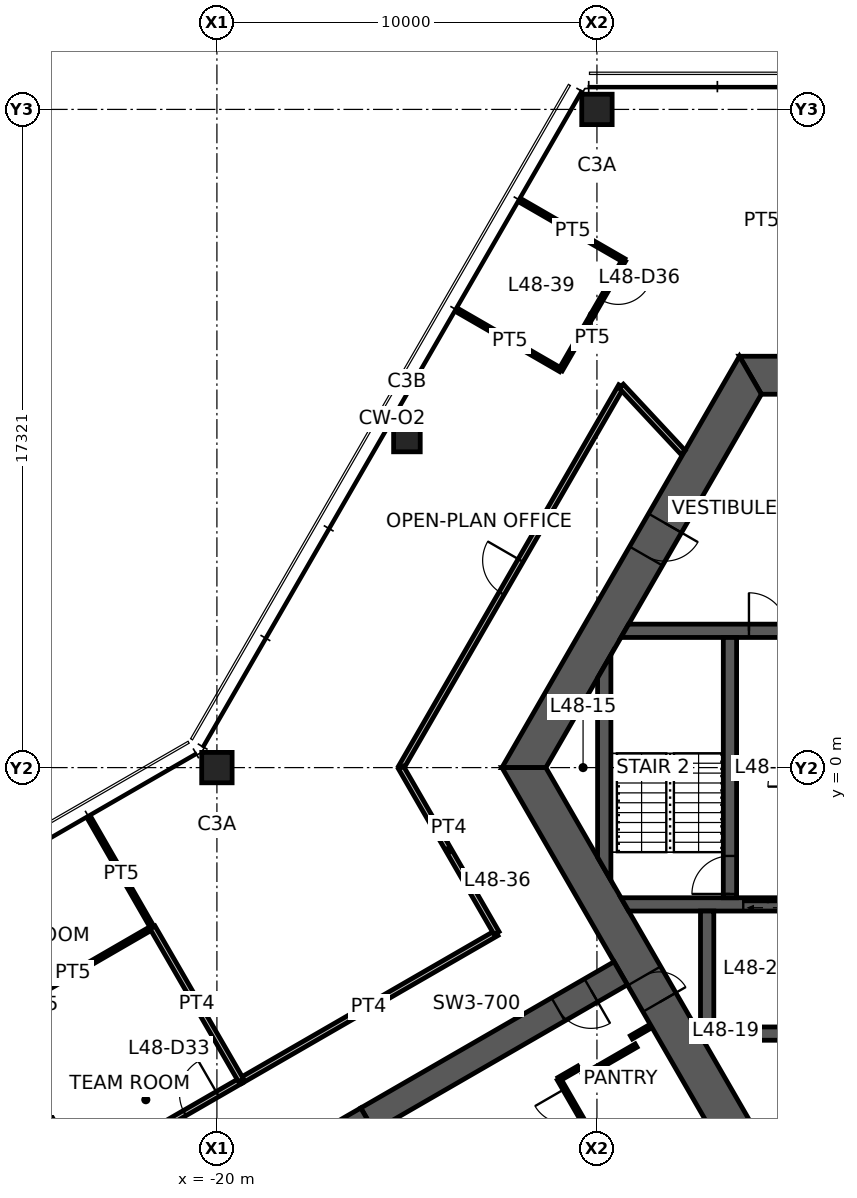
"""IFC4 building model, lengths in metres.
Left out: names, types, materials, properties, quantities, classifications, styles, units other than length and angle.
Written with IfcOpenShell. Run it as: python <this file> out.ifc"""

import sys

from ifc_helpers import new_model, si_unit, direction, frame, frame_2d, origin, origin_2d, place, context, subcontext, project, spatial, polyline, rectangle, hollow_rectangle, outline, extrude, element, fill, save


model = new_model("IFC4")
c1 = context("Model", 3, precision=1e-05, world=origin(), true_north=direction((0.0, 1.0)))
c2 = subcontext(c1, "Body", "Model", "MODEL_VIEW")
j1 = project(units=[si_unit("LENGTHUNIT", "METRE"), si_unit("PLANEANGLEUNIT", "RADIAN")], contexts=[c1])
p1 = place(None, origin())
s1 = spatial("IfcSite", under=j1, at=p1, CompositionType="ELEMENT")
p2 = place(p1, origin())
s2 = spatial("IfcBuilding", under=s1, at=p2, CompositionType="ELEMENT")
p3 = place(p2, frame((0.0, 0.0, 191.6)))
s3 = spatial("IfcBuildingStorey", under=s2, at=p3, CompositionType="ELEMENT", Elevation=191.6)
for number, where, z_axis, x_axis in (
    (1, (-10.0, 17.321, 0.0), (0.0, 0.0, 1.0), (1.0, 0.0, 0.0)),
    (2, (-20.0, 0.0, 0.0), (0.0, 0.0, 1.0), (1.0, 0.0, 0.0)),
):
    element("IfcColumn", number, at=place(p3, frame(where, z_axis=z_axis, x_axis=x_axis)), inside=s3, PredefinedType="COLUMN", context=c2, shape_type="SweptSolid", body=[
        extrude(hollow_rectangle(XDim=0.8, YDim=0.8, WallThickness=0.045, at=origin_2d()), origin(), (0.0, 0.0, 1.0), 3.9),
    ])
p4 = place(p3, frame((-15.0, 8.66, 0.0), z_axis=(0.0, 0.0, 1.0), x_axis=(1.0, 0.0, 0.0)))
e3 = element("IfcColumn", 3, at=p4, inside=s3, PredefinedType="COLUMN", context=c2, shape_type="SweptSolid", body=[
    extrude(hollow_rectangle(XDim=0.7, YDim=0.7, WallThickness=0.036, at=origin_2d()), origin(), (0.0, 0.0, 1.0), 3.9),
])
p5 = place(p3, frame((5.961, 10.325, 0.0), z_axis=(0.0, 0.0, 1.0), x_axis=(-1.0, 0.0, 0.0)))
e4 = element("IfcWall", 4, at=p5, inside=s3, PredefinedType="SHEAR", context=c2, shape_type="SweptSolid", body=[
    extrude(outline(polyline([(-0.289, -0.5), (4.624, -0.5), (5.523, -0.5), (6.399, -0.5), (7.299, -0.5), (12.211, -0.5), (11.634, 0.5), (7.299, 0.5), (6.399, 0.5), (5.523, 0.5), (4.624, 0.5), (0.289, 0.5), (-0.289, -0.5)])), origin(), (0.0, 0.0, 1.0), 3.9),
])
p6 = place(p5, frame((6.399, 0.0, 0.0)))
e5 = element("IfcOpeningElement", 5, at=p6, cuts=e4, PredefinedType="OPENING", context=c2, shape_type="SweptSolid", body=[
    extrude(rectangle(XDim=0.9, YDim=2.1, at=frame_2d((0.45, 1.05))), frame((0.0, 0.51, 0.0), z_axis=(0.0, -1.0, 0.0), x_axis=(1.0, 0.0, 0.0)), (0.0, 0.0, 1.0), 1.02),
])
p7 = place(p5, frame((4.624, 0.0, 0.0)))
e6 = element("IfcOpeningElement", 6, at=p7, cuts=e4, PredefinedType="OPENING", context=c2, shape_type="SweptSolid", body=[
    extrude(rectangle(XDim=0.9, YDim=2.1, at=frame_2d((0.45, 1.05))), frame((0.0, 0.51, 0.0), z_axis=(0.0, -1.0, 0.0), x_axis=(1.0, 0.0, 0.0)), (0.0, 0.0, 1.0), 1.02),
])
p8 = place(p3, frame((-5.961, 10.325, 0.0), z_axis=(0.0, 0.0, 1.0), x_axis=(-0.500004296715, -0.866022923061, 0.0)))
e7 = element("IfcWall", 7, at=p8, inside=s3, PredefinedType="SHEAR", context=c2, shape_type="SweptSolid", body=[
    extrude(outline(polyline([(-0.289, -0.5), (4.494, -0.5), (5.494, -0.5), (12.211, -0.5), (11.634, 0.5), (5.494, 0.5), (4.494, 0.5), (0.289, 0.5), (-0.289, -0.5)])), origin(), (0.0, 0.0, 1.0), 3.9),
])
p9 = place(p8, frame((4.494, 0.0, 0.0)))
e8 = element("IfcOpeningElement", 8, at=p9, cuts=e7, PredefinedType="OPENING", context=c2, shape_type="SweptSolid", body=[
    extrude(rectangle(XDim=1.0, YDim=2.1, at=frame_2d((0.5, 1.05))), frame((0.0, 0.51, 0.0), z_axis=(0.0, -1.0, 0.0), x_axis=(1.0, 0.0, 0.0)), (0.0, 0.0, 1.0), 1.02),
])
p10 = place(p3, frame((-11.922, 0.0, 0.0), z_axis=(0.0, 0.0, 1.0), x_axis=(0.500004296715, -0.866022923061, 0.0)))
e9 = element("IfcWall", 9, at=p10, inside=s3, PredefinedType="SHEAR", context=c2, shape_type="SweptSolid", body=[
    extrude(outline(polyline([(-0.289, -0.5), (6.331, -0.5), (7.131, -0.5), (12.211, -0.5), (11.634, 0.5), (7.131, 0.5), (6.331, 0.5), (0.289, 0.5), (-0.289, -0.5)])), origin(), (0.0, 0.0, 1.0), 3.9),
])
p11 = place(p10, frame((6.331, 0.0, 0.0)))
e10 = element("IfcOpeningElement", 10, at=p11, cuts=e9, PredefinedType="OPENING", context=c2, shape_type="SweptSolid", body=[
    extrude(rectangle(XDim=0.8, YDim=2.1, at=frame_2d((0.4, 1.05))), frame((0.0, 0.51, 0.0), z_axis=(0.0, -1.0, 0.0), x_axis=(1.0, 0.0, 0.0)), (0.0, 0.0, 1.0), 1.02),
])
p12 = place(p3, frame((-9.375, -5.413, 0.0), z_axis=(0.0, 0.0, 1.0), x_axis=(-0.866032377459, -0.499987921047, 0.0)))
e11 = element("IfcWall", 11, at=p12, inside=s3, PredefinedType="SHEAR", context=c2, shape_type="SweptSolid", body=[
    extrude(rectangle(XDim=7.696, YDim=0.7, at=frame_2d((3.848, 0.0))), origin(), (0.0, 0.0, 1.0), 3.9),
])
p13 = place(p12, frame((0.9, 0.0, 0.0)))
e12 = element("IfcOpeningElement", 12, at=p13, cuts=e11, PredefinedType="OPENING", context=c2, shape_type="SweptSolid", body=[
    extrude(rectangle(XDim=1.0, YDim=2.1, at=frame_2d((0.5, 1.05))), frame((0.0, 0.36, 0.0), z_axis=(0.0, -1.0, 0.0), x_axis=(1.0, 0.0, 0.0)), (0.0, 0.0, 1.0), 0.72),
])
p14 = place(p3, frame((-16.039, -9.26, 0.0), z_axis=(0.0, 0.0, 1.0), x_axis=(-0.866024837091, -0.50000098154, 0.0)))
e13 = element("IfcWall", 13, at=p14, inside=s3, PredefinedType="SHEAR", context=c2, shape_type="SweptSolid", body=[
    extrude(rectangle(XDim=13.0, YDim=0.7, at=frame_2d((6.5, 0.0))), origin(), (0.0, 0.0, 1.0), 3.9),
])
p15 = place(p3, frame((-9.266, 3.6, 0.0), z_axis=(0.0, 0.0, 1.0), x_axis=(1.0, 0.0, 0.0)))
e14 = element("IfcWall", 14, at=p15, inside=s3, PredefinedType="SHEAR", context=c2, shape_type="SweptSolid", body=[
    extrude(outline(polyline([(-0.101, -0.175), (3.266, -0.175), (4.266, -0.175), (5.667, -0.175), (6.767, -0.175), (7.841, -0.175), (7.841, 0.175), (6.767, 0.175), (5.667, 0.175), (4.266, 0.175), (3.266, 0.175), (0.101, 0.175), (-0.101, -0.175)])), origin(), (0.0, 0.0, 1.0), 3.9),
])
p16 = place(p15, frame((3.266, 0.0, 0.0)))
e15 = element("IfcOpeningElement", 15, at=p16, cuts=e14, PredefinedType="OPENING", context=c2, shape_type="SweptSolid", body=[
    extrude(rectangle(XDim=1.0, YDim=2.1, at=frame_2d((0.5, 1.05))), frame((0.0, 0.185, 0.0), z_axis=(0.0, -1.0, 0.0), x_axis=(1.0, 0.0, 0.0)), (0.0, 0.0, 1.0), 0.37),
])
p17 = place(p15, frame((5.667, 0.0, 0.0)))
e16 = element("IfcOpeningElement", 16, at=p17, cuts=e14, PredefinedType="OPENING", context=c2, shape_type="SweptSolid", body=[
    extrude(rectangle(XDim=1.1, YDim=2.1, at=frame_2d((0.55, 1.05))), frame((0.0, 0.185, 0.0), z_axis=(0.0, -1.0, 0.0), x_axis=(1.0, 0.0, 0.0)), (0.0, 0.0, 1.0), 0.37),
])
p18 = place(p3, frame((-9.266, -3.6, 0.0), z_axis=(0.0, 0.0, 1.0), x_axis=(1.0, 0.0, 0.0)))
e17 = element("IfcWall", 17, at=p18, inside=s3, PredefinedType="SHEAR", context=c2, shape_type="SweptSolid", body=[
    extrude(outline(polyline([(0.101, -0.175), (3.116, -0.175), (4.417, -0.175), (5.667, -0.175), (6.767, -0.175), (7.841, -0.175), (7.841, 0.175), (6.767, 0.175), (5.667, 0.175), (4.417, 0.175), (3.116, 0.175), (-0.101, 0.175), (0.101, -0.175)])), origin(), (0.0, 0.0, 1.0), 3.9),
])
p19 = place(p18, frame((5.667, 0.0, 0.0)))
e18 = element("IfcOpeningElement", 18, at=p19, cuts=e17, PredefinedType="OPENING", context=c2, shape_type="SweptSolid", body=[
    extrude(rectangle(XDim=1.1, YDim=2.1, at=frame_2d((0.55, 1.05))), frame((0.0, 0.185, 0.0), z_axis=(0.0, -1.0, 0.0), x_axis=(1.0, 0.0, 0.0)), (0.0, 0.0, 1.0), 0.37),
])
p20 = place(p18, frame((3.116, 0.0, 0.0)))
e19 = element("IfcOpeningElement", 19, at=p20, cuts=e17, PredefinedType="OPENING", context=c2, shape_type="SweptSolid", body=[
    extrude(rectangle(XDim=1.3, YDim=2.1, at=frame_2d((0.65, 1.05))), frame((0.0, 0.185, 0.0), z_axis=(0.0, -1.0, 0.0), x_axis=(1.0, 0.0, 0.0)), (0.0, 0.0, 1.0), 0.37),
])
p21 = place(p3, frame((-6.5, -3.425, 0.0), z_axis=(0.0, 0.0, 1.0), x_axis=(0.0, 1.0, 0.0)))
e20 = element("IfcWall", 20, at=p21, inside=s3, PredefinedType="SHEAR", context=c2, shape_type="SweptSolid", body=[
    extrude(rectangle(XDim=6.85, YDim=0.35, at=frame_2d((3.425, 0.0))), origin(), (0.0, 0.0, 1.0), 3.9),
])
p22 = place(p21, frame((0.1, 0.0, 0.0)))
e21 = element("IfcOpeningElement", 21, at=p22, cuts=e20, PredefinedType="OPENING", context=c2, shape_type="SweptSolid", body=[
    extrude(rectangle(XDim=1.0, YDim=2.1, at=frame_2d((0.5, 1.05))), frame((0.0, 0.185, 0.0), z_axis=(0.0, -1.0, 0.0), x_axis=(1.0, 0.0, 0.0)), (0.0, 0.0, 1.0), 0.37),
])
p23 = place(p3, frame((-6.925, -7.0, 0.0), z_axis=(0.0, 0.0, 1.0), x_axis=(1.0, 0.0, 0.0)))
e22 = element("IfcWall", 22, at=p23, inside=s3, PredefinedType="SHEAR", context=c2, shape_type="SweptSolid", body=[
    extrude(rectangle(XDim=2.25, YDim=0.35, at=frame_2d((1.125, 0.0))), origin(), (0.0, 0.0, 1.0), 3.9),
])
p24 = place(p3, frame((-7.1, -3.775, 0.0), z_axis=(0.0, 0.0, 1.0), x_axis=(0.0, -1.0, 0.0)))
e23 = element("IfcWall", 23, at=p24, inside=s3, PredefinedType="SHEAR", context=c2, shape_type="SweptSolid", body=[
    extrude(outline(polyline([(0.0, -0.175), (3.274, -0.175), (3.4, 0.0), (3.4, 0.175), (0.0, 0.175), (0.0, -0.175)])), origin(), (0.0, 0.0, 1.0), 3.9),
])
p25 = place(p3, frame((-9.808, -2.662, 0.0), z_axis=(0.0, 0.0, 1.0), x_axis=(0.0, 1.0, 0.0)))
e24 = element("IfcWall", 24, at=p25, inside=s3, PredefinedType="SHEAR", context=c2, shape_type="SweptSolid", body=[
    extrude(outline(polyline([(-0.303, -0.175), (5.628, -0.175), (5.021, 0.175), (0.303, 0.175), (-0.303, -0.175)])), origin(), (0.0, 0.0, 1.0), 3.9),
])
p26 = place(p3, frame((-19.372, -8.24, 0.0), z_axis=(0.0, 0.0, 1.0), x_axis=(0.866015031168, 0.500017965468, 0.0)))
e25 = element("IfcWall", 25, at=p26, inside=s3, PredefinedType="PARTITIONING", context=c2, shape_type="SweptSolid", body=[
    extrude(rectangle(XDim=7.771, YDim=0.15, at=frame_2d((3.886, 0.0))), origin(), (0.0, 0.0, 1.0), 2.95),
])
p27 = place(p3, frame((-15.156, 0.0, 0.0), z_axis=(0.0, 0.0, 1.0), x_axis=(0.500012970505, 0.86601791513, 0.0)))
e26 = element("IfcWall", 26, at=p27, inside=s3, PredefinedType="PARTITIONING", context=c2, shape_type="SweptSolid", body=[
    extrude(rectangle(XDim=11.591, YDim=0.15, at=frame_2d((5.795, 0.0))), origin(), (0.0, 0.0, 1.0), 2.95),
])
p28 = place(p27, frame((5.295, 0.0, 0.0)))
e27 = element("IfcOpeningElement", 27, at=p28, cuts=e26, PredefinedType="OPENING", context=c2, shape_type="SweptSolid", body=[
    extrude(rectangle(XDim=1.0, YDim=2.1, at=frame_2d((0.5, 1.05))), frame((0.0, 0.085, 0.0), z_axis=(0.0, -1.0, 0.0), x_axis=(1.0, 0.0, 0.0)), (0.0, 0.0, 1.0), 0.17),
])
p29 = place(p3, frame((-12.642, -4.354, 0.0), z_axis=(0.0, 0.0, 1.0), x_axis=(-0.500019495363, 0.866014147839, 0.0)))
e28 = element("IfcWall", 28, at=p29, inside=s3, PredefinedType="PARTITIONING", context=c2, shape_type="SweptSolid", body=[
    extrude(rectangle(XDim=5.028, YDim=0.15, at=frame_2d((2.514, 0.0))), origin(), (0.0, 0.0, 1.0), 2.95),
])
p30 = place(p3, frame((-9.36, 10.038, 0.0), z_axis=(0.0, 0.0, 1.0), x_axis=(0.681997114248, -0.731354863358, 0.0)))
e29 = element("IfcWall", 29, at=p30, inside=s3, PredefinedType="PARTITIONING", context=c2, shape_type="SweptSolid", body=[
    extrude(outline(polyline([(0.0, -0.075), (2.384, -0.075), (2.384, 0.0), (2.382, 0.075), (0.0, 0.075), (0.0, -0.075)])), origin(), (0.0, 0.0, 1.0), 2.95),
])
p31 = place(p3, frame((-21.471, -9.452, 0.0), z_axis=(0.0, 0.0, 1.0), x_axis=(0.866025270247, 0.500000231294, 0.0)))
e30 = element("IfcWall", 30, at=p31, inside=s3, PredefinedType="PARTITIONING", context=c2, shape_type="SweptSolid", body=[
    extrude(rectangle(XDim=2.435, YDim=0.15, at=frame_2d((1.217, 0.0))), origin(), (0.0, 0.0, 1.0), 2.95),
])
p32 = place(p31, frame((0.717, 0.0, 0.0)))
e31 = element("IfcOpeningElement", 31, at=p32, cuts=e30, PredefinedType="OPENING", context=c2, shape_type="SweptSolid", body=[
    extrude(rectangle(XDim=1.0, YDim=2.1, at=frame_2d((0.5, 1.05))), frame((0.0, 0.085, 0.0), z_axis=(0.0, -1.0, 0.0), x_axis=(1.0, 0.0, 0.0)), (0.0, 0.0, 1.0), 0.17),
])
p33 = place(p3, frame((-25.878, -6.627, 0.0), z_axis=(0.0, 0.0, 1.0), x_axis=(0.500502111965, -0.865735315162, 0.0)))
e32 = element("IfcWall", 32, at=p33, inside=s3, PredefinedType="PARTITIONING", context=c2, shape_type="SweptSolid", body=[
    extrude(rectangle(XDim=6.83, YDim=0.1, at=frame_2d((3.415, 0.0))), origin(), (0.0, 0.0, 1.0), 2.95),
])
p34 = place(p33, frame((5.63, 0.0, 0.0)))
e33 = element("IfcOpeningElement", 33, at=p34, cuts=e32, PredefinedType="OPENING", context=c2, shape_type="SweptSolid", body=[
    extrude(rectangle(XDim=0.9, YDim=2.1, at=frame_2d((0.45, 1.05))), frame((0.0, 0.06, 0.0), z_axis=(0.0, -1.0, 0.0), x_axis=(1.0, 0.0, 0.0)), (0.0, 0.0, 1.0), 0.12),
])
p35 = place(p3, frame((-23.332, -1.37, 0.0), z_axis=(0.0, 0.0, 1.0), x_axis=(0.498789948492, -0.866722901095, 0.0)))
e34 = element("IfcWall", 34, at=p35, inside=s3, PredefinedType="PARTITIONING", context=c2, shape_type="SweptSolid", body=[
    extrude(rectangle(XDim=3.28, YDim=0.1, at=frame_2d((1.64, 0.0))), origin(), (0.0, 0.0, 1.0), 2.95),
])
p36 = place(p3, frame((-21.695, -4.206, 0.0), z_axis=(0.0, 0.0, 1.0), x_axis=(-0.865554211136, -0.500815242963, 0.0)))
e35 = element("IfcWall", 35, at=p36, inside=s3, PredefinedType="PARTITIONING", context=c2, shape_type="SweptSolid", body=[
    extrude(rectangle(XDim=4.833, YDim=0.1, at=frame_2d((2.417, 0.0))), origin(), (0.0, 0.0, 1.0), 2.95),
])
p37 = place(p36, frame((3.633, 0.0, 0.0)))
e36 = element("IfcOpeningElement", 36, at=p37, cuts=e35, PredefinedType="OPENING", context=c2, shape_type="SweptSolid", body=[
    extrude(rectangle(XDim=0.9, YDim=2.1, at=frame_2d((0.45, 1.05))), frame((0.0, 0.06, 0.0), z_axis=(0.0, -1.0, 0.0), x_axis=(1.0, 0.0, 0.0)), (0.0, 0.0, 1.0), 0.12),
])
p38 = place(p3, frame((-11.98, 14.902, 0.0), z_axis=(0.0, 0.0, 1.0), x_axis=(0.866042875753, -0.499969736442, 0.0)))
e37 = element("IfcWall", 37, at=p38, inside=s3, PredefinedType="PARTITIONING", context=c2, shape_type="SweptSolid", body=[
    extrude(rectangle(XDim=3.105, YDim=0.1, at=frame_2d((1.553, 0.0))), origin(), (0.0, 0.0, 1.0), 2.95),
])
p39 = place(p3, frame((-10.956, 10.465, 0.0), z_axis=(0.0, 0.0, 1.0), x_axis=(-0.866044340336, 0.499967199496, 0.0)))
e38 = element("IfcWall", 38, at=p39, inside=s3, PredefinedType="PARTITIONING", context=c2, shape_type="SweptSolid", body=[
    extrude(rectangle(XDim=3.08, YDim=0.1, at=frame_2d((1.54, 0.0))), origin(), (0.0, 0.0, 1.0), 2.95),
])
p40 = place(p3, frame((-9.291, 13.349, 0.0), z_axis=(0.0, 0.0, 1.0), x_axis=(-0.500033344505, -0.86600615147, 0.0)))
e39 = element("IfcWall", 39, at=p40, inside=s3, PredefinedType="PARTITIONING", context=c2, shape_type="SweptSolid", body=[
    extrude(rectangle(XDim=3.331, YDim=0.1, at=frame_2d((1.666, 0.0))), origin(), (0.0, 0.0, 1.0), 2.95),
])
p41 = place(p40, frame((0.3, 0.0, 0.0)))
e40 = element("IfcOpeningElement", 40, at=p41, cuts=e39, PredefinedType="OPENING", context=c2, shape_type="SweptSolid", body=[
    extrude(rectangle(XDim=0.9, YDim=2.1, at=frame_2d((0.45, 1.05))), frame((0.0, 0.06, 0.0), z_axis=(0.0, -1.0, 0.0), x_axis=(1.0, 0.0, 0.0)), (0.0, 0.0, 1.0), 0.12),
])
p42 = place(p3, frame((-19.363, -8.234, 0.0), z_axis=(0.0, 0.0, 1.0), x_axis=(-0.500877035324, 0.865518454734, 0.0)))
e41 = element("IfcWall", 41, at=p42, inside=s3, PredefinedType="PARTITIONING", context=c2, shape_type="SweptSolid", body=[
    extrude(rectangle(XDim=4.654, YDim=0.15, at=frame_2d((2.327, 0.0))), origin(), (0.0, 0.0, 1.0), 2.95),
])
p43 = place(p3, frame((-11.0, -8.198, 0.0), z_axis=(0.0, 0.0, 1.0), x_axis=(0.866131372301, 0.499816412211, 0.0)))
e42 = element("IfcWall", 42, at=p43, inside=s3, PredefinedType="PARTITIONING", context=c2, shape_type="SweptSolid", body=[
    extrude(rectangle(XDim=0.6, YDim=0.1, at=frame_2d((0.3, 0.0))), origin(), (0.0, 0.0, 1.0), 2.95),
])
p44 = place(p3, frame((-10.355, -8.115, 0.0), z_axis=(0.0, 0.0, 1.0), x_axis=(0.866094119867, 0.499880961361, 0.0)))
e43 = element("IfcWall", 43, at=p44, inside=s3, PredefinedType="PARTITIONING", context=c2, shape_type="SweptSolid", body=[
    extrude(rectangle(XDim=1.6, YDim=0.1, at=frame_2d((0.8, 0.0))), origin(), (0.0, 0.0, 1.0), 2.95),
])
p45 = place(p3, frame((-9.5, -10.796, 0.0), z_axis=(0.0, 0.0, 1.0), x_axis=(-0.499990139034, 0.866031096941, 0.0)))
e44 = element("IfcWall", 44, at=p45, inside=s3, PredefinedType="PARTITIONING", context=c2, shape_type="SweptSolid", body=[
    extrude(rectangle(XDim=3.0, YDim=0.1, at=frame_2d((1.5, 0.0))), origin(), (0.0, 0.0, 1.0), 2.95),
])
p46 = place(p45, frame((1.8, 0.0, 0.0)))
e45 = element("IfcOpeningElement", 45, at=p46, cuts=e44, PredefinedType="OPENING", context=c2, shape_type="SweptSolid", body=[
    extrude(rectangle(XDim=0.9, YDim=2.1, at=frame_2d((0.45, 1.05))), frame((0.0, 0.06, 0.0), z_axis=(0.0, -1.0, 0.0), x_axis=(1.0, 0.0, 0.0)), (0.0, 0.0, 1.0), 0.12),
])
p47 = place(p3, frame((-9.094, -7.098, 0.0), z_axis=(0.0, 0.0, 1.0), x_axis=(0.865954211699, 0.50012328804, 0.0)))
e46 = element("IfcWall", 46, at=p47, inside=s3, PredefinedType="PARTITIONING", context=c2, shape_type="SweptSolid", body=[
    extrude(rectangle(XDim=0.58, YDim=0.1, at=frame_2d((0.29, 0.0))), origin(), (0.0, 0.0, 1.0), 2.95),
])
p48 = place(p11, origin())
e47 = element("IfcDoor", 47, at=p48, inside=s3, OperationType="SINGLE_SWING_RIGHT", PredefinedType="DOOR", context=c2, shape_type="SweptSolid", body=[
    extrude(rectangle(XDim=0.8, YDim=2.1, at=frame_2d((0.4, 1.05))), frame((0.0, 0.025, 0.0), z_axis=(0.0, -1.0, 0.0), x_axis=(1.0, 0.0, 0.0)), (0.0, 0.0, 1.0), 0.05),
])
fill(e10, e47)
p49 = place(p9, origin())
e48 = element("IfcDoor", 48, at=p49, inside=s3, OperationType="SINGLE_SWING_LEFT", PredefinedType="DOOR", context=c2, shape_type="SweptSolid", body=[
    extrude(rectangle(XDim=1.0, YDim=2.1, at=frame_2d((0.5, 1.05))), frame((0.0, 0.025, 0.0), z_axis=(0.0, -1.0, 0.0), x_axis=(1.0, 0.0, 0.0)), (0.0, 0.0, 1.0), 0.05),
])
fill(e8, e48)
p50 = place(p22, origin())
e49 = element("IfcDoor", 49, at=p50, inside=s3, OperationType="SINGLE_SWING_LEFT", PredefinedType="DOOR", context=c2, shape_type="SweptSolid", body=[
    extrude(rectangle(XDim=1.0, YDim=2.1, at=frame_2d((0.5, 1.05))), frame((0.0, 0.025, 0.0), z_axis=(0.0, -1.0, 0.0), x_axis=(1.0, 0.0, 0.0)), (0.0, 0.0, 1.0), 0.05),
])
fill(e21, e49)
p51 = place(p16, origin())
e50 = element("IfcDoor", 50, at=p51, inside=s3, OperationType="SINGLE_SWING_LEFT", PredefinedType="DOOR", context=c2, shape_type="SweptSolid", body=[
    extrude(rectangle(XDim=1.0, YDim=2.1, at=frame_2d((0.5, 1.05))), frame((0.0, 0.025, 0.0), z_axis=(0.0, -1.0, 0.0), x_axis=(1.0, 0.0, 0.0)), (0.0, 0.0, 1.0), 0.05),
])
fill(e15, e50)
p52 = place(p13, origin())
e51 = element("IfcDoor", 51, at=p52, inside=s3, OperationType="SINGLE_SWING_LEFT", PredefinedType="DOOR", context=c2, shape_type="SweptSolid", body=[
    extrude(rectangle(XDim=1.0, YDim=2.1, at=frame_2d((0.5, 1.05))), frame((0.0, 0.025, 0.0), z_axis=(0.0, -1.0, 0.0), x_axis=(1.0, 0.0, 0.0)), (0.0, 0.0, 1.0), 0.05),
])
fill(e12, e51)
p53 = place(p28, origin())
e52 = element("IfcDoor", 52, at=p53, inside=s3, OperationType="SINGLE_SWING_RIGHT", PredefinedType="DOOR", context=c2, shape_type="SweptSolid", body=[
    extrude(rectangle(XDim=1.0, YDim=2.1, at=frame_2d((0.5, 1.05))), frame((0.0, 0.025, 0.0), z_axis=(0.0, -1.0, 0.0), x_axis=(1.0, 0.0, 0.0)), (0.0, 0.0, 1.0), 0.05),
])
fill(e27, e52)
p54 = place(p32, origin())
e53 = element("IfcDoor", 53, at=p54, inside=s3, OperationType="SINGLE_SWING_RIGHT", PredefinedType="DOOR", context=c2, shape_type="SweptSolid", body=[
    extrude(rectangle(XDim=1.0, YDim=2.1, at=frame_2d((0.5, 1.05))), frame((0.0, 0.025, 0.0), z_axis=(0.0, -1.0, 0.0), x_axis=(1.0, 0.0, 0.0)), (0.0, 0.0, 1.0), 0.05),
])
fill(e31, e53)
p55 = place(p41, origin())
e54 = element("IfcDoor", 54, at=p55, inside=s3, OperationType="SINGLE_SWING_LEFT", PredefinedType="DOOR", context=c2, shape_type="SweptSolid", body=[
    extrude(rectangle(XDim=0.9, YDim=2.1, at=frame_2d((0.45, 1.05))), frame((0.0, 0.025, 0.0), z_axis=(0.0, -1.0, 0.0), x_axis=(1.0, 0.0, 0.0)), (0.0, 0.0, 1.0), 0.05),
])
fill(e40, e54)
p56 = place(p46, origin())
e55 = element("IfcDoor", 55, at=p56, inside=s3, OperationType="SINGLE_SWING_RIGHT", PredefinedType="DOOR", context=c2, shape_type="SweptSolid", body=[
    extrude(rectangle(XDim=0.9, YDim=2.1, at=frame_2d((0.45, 1.05))), frame((0.0, 0.025, 0.0), z_axis=(0.0, -1.0, 0.0), x_axis=(1.0, 0.0, 0.0)), (0.0, 0.0, 1.0), 0.05),
])
fill(e45, e55)
p57 = place(p20, origin())
e56 = element("IfcDoor", 56, at=p57, inside=s3, OperationType="DOUBLE_DOOR_SLIDING", PredefinedType="DOOR", context=c2, shape_type="SweptSolid", body=[
    extrude(rectangle(XDim=1.3, YDim=2.1, at=frame_2d((0.65, 1.05))), frame((0.0, 0.025, 0.0), z_axis=(0.0, -1.0, 0.0), x_axis=(1.0, 0.0, 0.0)), (0.0, 0.0, 1.0), 0.05),
])
fill(e19, e56)
save(model, sys.argv[1])
